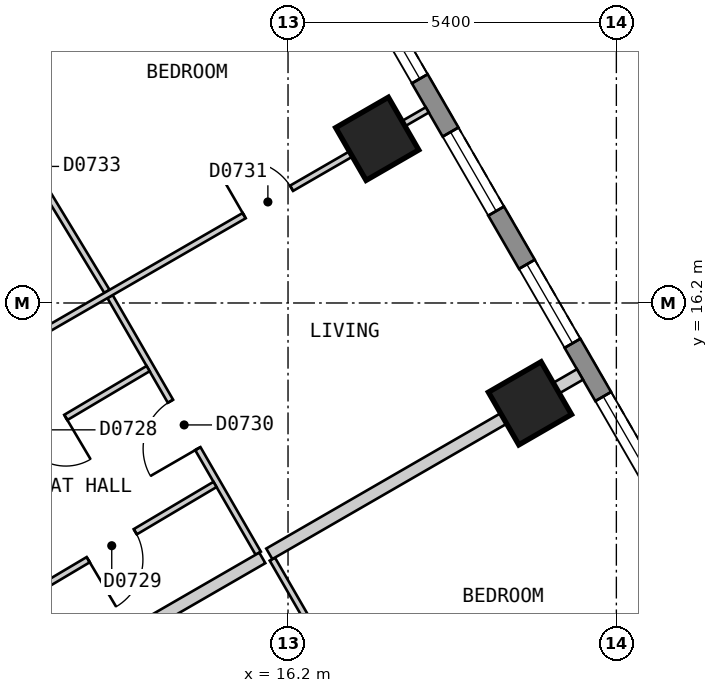
"""IFC4 building model, lengths in metres.
Left out: names, types, materials, properties, quantities, classifications, styles, units other than length and angle.
Written with IfcOpenShell. Run it as: python <this file> out.ifc"""

import sys

from ifc_helpers import new_model, si_unit, direction, frame, frame_2d, origin, origin_2d, place, context, subcontext, project, spatial, polyline, rectangle, outline, extrude, element, fill, save


model = new_model("IFC4")
c1 = context("Model", 3, precision=1e-05, world=origin(), true_north=direction((0.0, 1.0)))
c2 = subcontext(c1, "Body", "Model", "MODEL_VIEW")
j1 = project(units=[si_unit("LENGTHUNIT", "METRE"), si_unit("PLANEANGLEUNIT", "RADIAN")], contexts=[c1])
p1 = place(None, origin())
s1 = spatial("IfcSite", under=j1, at=p1, CompositionType="ELEMENT")
p2 = place(p1, origin())
s2 = spatial("IfcBuilding", under=s1, at=p2, CompositionType="ELEMENT")
p3 = place(p2, frame((0.0, 0.0, 105.0)))
s3 = spatial("IfcBuildingStorey", under=s2, at=p3, CompositionType="ELEMENT", Elevation=105.0)
for number, where, z_axis, x_axis in (
    (1, (20.179, 14.55, 0.0), (0.0, 0.0, 1.0), (-0.5, 0.866, 0.0)),
    (2, (17.667, 18.9, 0.0), (0.0, 0.0, 1.0), (-0.5, 0.866, 0.0)),
):
    element("IfcColumn", number, at=place(p3, frame(where, z_axis=z_axis, x_axis=x_axis)), inside=s3, PredefinedType="COLUMN", context=c2, shape_type="SweptSolid", body=[
        extrude(rectangle(XDim=1.0, YDim=1.0, at=origin_2d()), origin(), (0.0, 0.0, 1.0), 3.0),
    ])
p4 = place(p3, frame((29.027, 1.425, 0.0), z_axis=(0.0, 0.0, 1.0), x_axis=(-0.500027479704, 0.866009537788, 0.0)))
e3 = element("IfcWall", 3, at=p4, inside=s3, PredefinedType="SOLIDWALL", context=c2, shape_type="SweptSolid", body=[
    extrude(outline(polyline([(0.0, -0.15), (26.559, -0.15), (26.478, 0.15), (0.08, 0.15), (0.0, -0.15)])), origin(), (0.0, 0.0, 1.0), 2.6),
])
p5 = place(p4, frame((1.227, 0.0, 0.15)))
e4 = element("IfcOpeningElement", 4, at=p5, cuts=e3, PredefinedType="OPENING", context=c2, shape_type="SweptSolid", body=[
    extrude(rectangle(XDim=1.5, YDim=2.1, at=frame_2d((0.75, 1.05))), frame((0.0, 0.16, 0.0), z_axis=(0.0, -1.0, 0.0), x_axis=(1.0, 0.0, 0.0)), (0.0, 0.0, 1.0), 0.32),
])
p6 = place(p4, frame((3.738, 0.0, 0.15)))
e5 = element("IfcOpeningElement", 5, at=p6, cuts=e3, PredefinedType="OPENING", context=c2, shape_type="SweptSolid", body=[
    extrude(rectangle(XDim=1.5, YDim=2.1, at=frame_2d((0.75, 1.05))), frame((0.0, 0.16, 0.0), z_axis=(0.0, -1.0, 0.0), x_axis=(1.0, 0.0, 0.0)), (0.0, 0.0, 1.0), 0.32),
])
p7 = place(p4, frame((6.25, 0.0, 0.15)))
e6 = element("IfcOpeningElement", 6, at=p7, cuts=e3, PredefinedType="OPENING", context=c2, shape_type="SweptSolid", body=[
    extrude(rectangle(XDim=1.5, YDim=2.1, at=frame_2d((0.75, 1.05))), frame((0.0, 0.16, 0.0), z_axis=(0.0, -1.0, 0.0), x_axis=(1.0, 0.0, 0.0)), (0.0, 0.0, 1.0), 0.32),
])
p8 = place(p4, frame((8.761, 0.0, 0.15)))
e7 = element("IfcOpeningElement", 7, at=p8, cuts=e3, PredefinedType="OPENING", context=c2, shape_type="SweptSolid", body=[
    extrude(rectangle(XDim=1.5, YDim=2.1, at=frame_2d((0.75, 1.05))), frame((0.0, 0.16, 0.0), z_axis=(0.0, -1.0, 0.0), x_axis=(1.0, 0.0, 0.0)), (0.0, 0.0, 1.0), 0.32),
])
p9 = place(p4, frame((11.273, 0.0, 0.15)))
e8 = element("IfcOpeningElement", 8, at=p9, cuts=e3, PredefinedType="OPENING", context=c2, shape_type="SweptSolid", body=[
    extrude(rectangle(XDim=1.5, YDim=2.1, at=frame_2d((0.75, 1.05))), frame((0.0, 0.16, 0.0), z_axis=(0.0, -1.0, 0.0), x_axis=(1.0, 0.0, 0.0)), (0.0, 0.0, 1.0), 0.32),
])
p10 = place(p4, frame((13.785, 0.0, 0.15)))
e9 = element("IfcOpeningElement", 9, at=p10, cuts=e3, PredefinedType="OPENING", context=c2, shape_type="SweptSolid", body=[
    extrude(rectangle(XDim=1.5, YDim=2.1, at=frame_2d((0.75, 1.05))), frame((0.0, 0.16, 0.0), z_axis=(0.0, -1.0, 0.0), x_axis=(1.0, 0.0, 0.0)), (0.0, 0.0, 1.0), 0.32),
])
p11 = place(p4, frame((16.296, 0.0, 0.15)))
e10 = element("IfcOpeningElement", 10, at=p11, cuts=e3, PredefinedType="OPENING", context=c2, shape_type="SweptSolid", body=[
    extrude(rectangle(XDim=1.5, YDim=2.1, at=frame_2d((0.75, 1.05))), frame((0.0, 0.16, 0.0), z_axis=(0.0, -1.0, 0.0), x_axis=(1.0, 0.0, 0.0)), (0.0, 0.0, 1.0), 0.32),
])
p12 = place(p4, frame((18.807, 0.0, 0.15)))
e11 = element("IfcOpeningElement", 11, at=p12, cuts=e3, PredefinedType="OPENING", context=c2, shape_type="SweptSolid", body=[
    extrude(rectangle(XDim=1.5, YDim=2.1, at=frame_2d((0.75, 1.05))), frame((0.0, 0.16, 0.0), z_axis=(0.0, -1.0, 0.0), x_axis=(1.0, 0.0, 0.0)), (0.0, 0.0, 1.0), 0.32),
])
p13 = place(p4, frame((21.319, 0.0, 0.15)))
e12 = element("IfcOpeningElement", 12, at=p13, cuts=e3, PredefinedType="OPENING", context=c2, shape_type="SweptSolid", body=[
    extrude(rectangle(XDim=1.5, YDim=2.1, at=frame_2d((0.75, 1.05))), frame((0.0, 0.16, 0.0), z_axis=(0.0, -1.0, 0.0), x_axis=(1.0, 0.0, 0.0)), (0.0, 0.0, 1.0), 0.32),
])
p14 = place(p4, frame((23.831, 0.0, 0.15)))
e13 = element("IfcOpeningElement", 13, at=p14, cuts=e3, PredefinedType="OPENING", context=c2, shape_type="SweptSolid", body=[
    extrude(rectangle(XDim=1.5, YDim=2.1, at=frame_2d((0.75, 1.05))), frame((0.0, 0.16, 0.0), z_axis=(0.0, -1.0, 0.0), x_axis=(1.0, 0.0, 0.0)), (0.0, 0.0, 1.0), 0.32),
])
p15 = place(p3, frame((8.488, 16.5, 0.0), z_axis=(0.0, 0.0, 1.0), x_axis=(0.499986836607, -0.86603300354, 0.0)))
e14 = element("IfcWall", 14, at=p15, inside=s3, PredefinedType="PARTITIONING", context=c2, shape_type="SweptSolid", body=[
    extrude(rectangle(XDim=20.09, YDim=0.2, at=frame_2d((10.045, 0.0))), origin(), (0.0, 0.0, 1.0), 2.6),
])
p16 = place(p15, frame((14.569, 0.0, 0.0)))
e15 = element("IfcOpeningElement", 15, at=p16, cuts=e14, PredefinedType="OPENING", context=c2, shape_type="SweptSolid", body=[
    extrude(rectangle(XDim=1.0, YDim=2.1, at=frame_2d((0.5, 1.05))), frame((0.0, 0.11, 0.0), z_axis=(0.0, -1.0, 0.0), x_axis=(1.0, 0.0, 0.0)), (0.0, 0.0, 1.0), 0.22),
])
p17 = place(p15, frame((4.547, 0.0, 0.0)))
e16 = element("IfcOpeningElement", 16, at=p17, cuts=e14, PredefinedType="OPENING", context=c2, shape_type="SweptSolid", body=[
    extrude(rectangle(XDim=1.0, YDim=2.1, at=frame_2d((0.5, 1.05))), frame((0.0, 0.11, 0.0), z_axis=(0.0, -1.0, 0.0), x_axis=(1.0, 0.0, 0.0)), (0.0, 0.0, 1.0), 0.22),
])
p18 = place(p3, frame((10.706, 20.543, 0.0), z_axis=(0.0, 0.0, 1.0), x_axis=(0.518240414093, -0.855234981278, 0.0)))
e17 = element("IfcWall", 17, at=p18, inside=s3, PredefinedType="PARTITIONING", context=c2, shape_type="SweptSolid", body=[
    extrude(rectangle(XDim=4.855, YDim=0.1, at=frame_2d((2.427, 0.0))), origin(), (0.0, 0.0, 1.0), 2.6),
])
p19 = place(p18, frame((2.052, 0.0, 0.0)))
e18 = element("IfcOpeningElement", 18, at=p19, cuts=e17, PredefinedType="OPENING", context=c2, shape_type="SweptSolid", body=[
    extrude(rectangle(XDim=0.8, YDim=2.1, at=frame_2d((0.4, 1.05))), frame((0.0, 0.06, 0.0), z_axis=(0.0, -1.0, 0.0), x_axis=(1.0, 0.0, 0.0)), (0.0, 0.0, 1.0), 0.12),
])
p20 = place(p3, frame((13.273, 16.305, 0.0), z_axis=(0.0, 0.0, 1.0), x_axis=(0.500093956194, -0.865971151354, 0.0)))
e19 = element("IfcWall", 19, at=p20, inside=s3, PredefinedType="PARTITIONING", context=c2, shape_type="SweptSolid", body=[
    extrude(rectangle(XDim=4.873, YDim=0.1, at=frame_2d((2.437, 0.0))), origin(), (0.0, 0.0, 1.0), 2.6),
])
p21 = place(p20, frame((1.987, 0.0, 0.0)))
e20 = element("IfcOpeningElement", 20, at=p21, cuts=e19, PredefinedType="OPENING", context=c2, shape_type="SweptSolid", body=[
    extrude(rectangle(XDim=0.9, YDim=2.1, at=frame_2d((0.45, 1.05))), frame((0.0, 0.06, 0.0), z_axis=(0.0, -1.0, 0.0), x_axis=(1.0, 0.0, 0.0)), (0.0, 0.0, 1.0), 0.12),
])
p22 = place(p3, frame((15.942, 11.988, 0.0), z_axis=(0.0, 0.0, 1.0), x_axis=(0.499995794706, -0.866027831699, 0.0)))
e21 = element("IfcWall", 21, at=p22, inside=s3, PredefinedType="PARTITIONING", context=c2, shape_type="SweptSolid", body=[
    extrude(rectangle(XDim=4.922, YDim=0.1, at=frame_2d((2.461, 0.0))), origin(), (0.0, 0.0, 1.0), 2.6),
])
p23 = place(p3, frame((9.83, 14.375, 0.0), z_axis=(0.0, 0.0, 1.0), x_axis=(0.866016855193, 0.500014806302, 0.0)))
e22 = element("IfcWall", 22, at=p23, inside=s3, PredefinedType="PARTITIONING", context=c2, shape_type="SweptSolid", body=[
    extrude(rectangle(XDim=10.0, YDim=0.1, at=frame_2d((5.0, 0.0))), origin(), (0.0, 0.0, 1.0), 2.6),
])
p24 = place(p23, frame((6.523, 0.0, 0.0)))
e23 = element("IfcOpeningElement", 23, at=p24, cuts=e22, PredefinedType="OPENING", context=c2, shape_type="SweptSolid", body=[
    extrude(rectangle(XDim=0.9, YDim=2.1, at=frame_2d((0.45, 1.05))), frame((0.0, 0.06, 0.0), z_axis=(0.0, -1.0, 0.0), x_axis=(1.0, 0.0, 0.0)), (0.0, 0.0, 1.0), 0.12),
])
p25 = place(p3, frame((11.647, 11.227, 0.0), z_axis=(0.0, 0.0, 1.0), x_axis=(0.859997349349, 0.510298500011, 0.0)))
e24 = element("IfcWall", 24, at=p25, inside=s3, PredefinedType="PARTITIONING", context=c2, shape_type="SweptSolid", body=[
    extrude(rectangle(XDim=3.898, YDim=0.1, at=frame_2d((1.949, 0.0))), origin(), (0.0, 0.0, 1.0), 2.6),
])
p26 = place(p25, frame((1.473, 0.0, 0.0)))
e25 = element("IfcOpeningElement", 25, at=p26, cuts=e24, PredefinedType="OPENING", context=c2, shape_type="SweptSolid", body=[
    extrude(rectangle(XDim=0.9, YDim=2.1, at=frame_2d((0.45, 1.05))), frame((0.0, 0.06, 0.0), z_axis=(0.0, -1.0, 0.0), x_axis=(1.0, 0.0, 0.0)), (0.0, 0.0, 1.0), 0.12),
])
p27 = place(p3, frame((10.547, 13.133, 0.0), z_axis=(0.0, 0.0, 1.0), x_axis=(0.860090994311, 0.510140648749, 0.0)))
e26 = element("IfcWall", 26, at=p27, inside=s3, PredefinedType="PARTITIONING", context=c2, shape_type="SweptSolid", body=[
    extrude(rectangle(XDim=3.897, YDim=0.1, at=frame_2d((1.948, 0.0))), origin(), (0.0, 0.0, 1.0), 2.6),
])
p28 = place(p27, frame((1.523, 0.0, 0.0)))
e27 = element("IfcOpeningElement", 27, at=p28, cuts=e26, PredefinedType="OPENING", context=c2, shape_type="SweptSolid", body=[
    extrude(rectangle(XDim=0.8, YDim=2.1, at=frame_2d((0.4, 1.05))), frame((0.0, 0.06, 0.0), z_axis=(0.0, -1.0, 0.0), x_axis=(1.0, 0.0, 0.0)), (0.0, 0.0, 1.0), 0.12),
])
p29 = place(p3, frame((12.342, 10.025, 0.0), z_axis=(0.0, 0.0, 1.0), x_axis=(0.866033886885, 0.499985306551, 0.0)))
e28 = element("IfcWall", 28, at=p29, inside=s3, PredefinedType="PARTITIONING", context=c2, shape_type="SweptSolid", body=[
    extrude(rectangle(XDim=3.966, YDim=0.2, at=frame_2d((1.983, 0.0))), origin(), (0.0, 0.0, 1.0), 2.6),
])
p30 = place(p3, frame((15.892, 12.075, 0.0), z_axis=(0.0, 0.0, 1.0), x_axis=(0.866000883696, 0.500042467634, 0.0)))
e29 = element("IfcWall", 29, at=p30, inside=s3, PredefinedType="PARTITIONING", context=c2, shape_type="SweptSolid", body=[
    extrude(rectangle(XDim=5.899, YDim=0.2, at=frame_2d((2.95, 0.0))), origin(), (0.0, 0.0, 1.0), 2.6),
])
p31 = place(p10, origin())
e30 = element("IfcWindow", 30, at=p31, inside=s3, PartitioningType="SINGLE_PANEL", PredefinedType="WINDOW", context=c2, shape_type="SweptSolid", body=[
    extrude(rectangle(XDim=1.5, YDim=2.1, at=frame_2d((0.75, 1.05))), frame((0.0, 0.03, 0.0), z_axis=(0.0, -1.0, 0.0), x_axis=(1.0, 0.0, 0.0)), (0.0, 0.0, 1.0), 0.06),
])
fill(e9, e30)
p32 = place(p11, origin())
e31 = element("IfcWindow", 31, at=p32, inside=s3, PartitioningType="SINGLE_PANEL", PredefinedType="WINDOW", context=c2, shape_type="SweptSolid", body=[
    extrude(rectangle(XDim=1.5, YDim=2.1, at=frame_2d((0.75, 1.05))), frame((0.0, 0.03, 0.0), z_axis=(0.0, -1.0, 0.0), x_axis=(1.0, 0.0, 0.0)), (0.0, 0.0, 1.0), 0.06),
])
fill(e10, e31)
p33 = place(p12, origin())
e32 = element("IfcWindow", 32, at=p33, inside=s3, PartitioningType="SINGLE_PANEL", PredefinedType="WINDOW", context=c2, shape_type="SweptSolid", body=[
    extrude(rectangle(XDim=1.5, YDim=2.1, at=frame_2d((0.75, 1.05))), frame((0.0, 0.03, 0.0), z_axis=(0.0, -1.0, 0.0), x_axis=(1.0, 0.0, 0.0)), (0.0, 0.0, 1.0), 0.06),
])
fill(e11, e32)
p34 = place(p13, origin())
e33 = element("IfcWindow", 33, at=p34, inside=s3, PartitioningType="SINGLE_PANEL", PredefinedType="WINDOW", context=c2, shape_type="SweptSolid", body=[
    extrude(rectangle(XDim=1.5, YDim=2.1, at=frame_2d((0.75, 1.05))), frame((0.0, 0.03, 0.0), z_axis=(0.0, -1.0, 0.0), x_axis=(1.0, 0.0, 0.0)), (0.0, 0.0, 1.0), 0.06),
])
fill(e12, e33)
p35 = place(p28, origin())
e34 = element("IfcDoor", 34, at=p35, inside=s3, OperationType="SINGLE_SWING_RIGHT", PredefinedType="DOOR", context=c2, shape_type="SweptSolid", body=[
    extrude(rectangle(XDim=0.8, YDim=2.1, at=frame_2d((0.4, 1.05))), frame((0.0, 0.025, 0.0), z_axis=(0.0, -1.0, 0.0), x_axis=(1.0, 0.0, 0.0)), (0.0, 0.0, 1.0), 0.05),
])
fill(e27, e34)
p36 = place(p26, origin())
e35 = element("IfcDoor", 35, at=p36, inside=s3, OperationType="SINGLE_SWING_LEFT", PredefinedType="DOOR", context=c2, shape_type="SweptSolid", body=[
    extrude(rectangle(XDim=0.9, YDim=2.1, at=frame_2d((0.45, 1.05))), frame((0.0, 0.025, 0.0), z_axis=(0.0, -1.0, 0.0), x_axis=(1.0, 0.0, 0.0)), (0.0, 0.0, 1.0), 0.05),
])
fill(e25, e35)
p37 = place(p21, origin())
e36 = element("IfcDoor", 36, at=p37, inside=s3, OperationType="SINGLE_SWING_RIGHT", PredefinedType="DOOR", context=c2, shape_type="SweptSolid", body=[
    extrude(rectangle(XDim=0.9, YDim=2.1, at=frame_2d((0.45, 1.05))), frame((0.0, 0.025, 0.0), z_axis=(0.0, -1.0, 0.0), x_axis=(1.0, 0.0, 0.0)), (0.0, 0.0, 1.0), 0.05),
])
fill(e20, e36)
p38 = place(p24, origin())
e37 = element("IfcDoor", 37, at=p38, inside=s3, OperationType="SINGLE_SWING_LEFT", PredefinedType="DOOR", context=c2, shape_type="SweptSolid", body=[
    extrude(rectangle(XDim=0.9, YDim=2.1, at=frame_2d((0.45, 1.05))), frame((0.0, 0.025, 0.0), z_axis=(0.0, -1.0, 0.0), x_axis=(1.0, 0.0, 0.0)), (0.0, 0.0, 1.0), 0.05),
])
fill(e23, e37)
save(model, sys.argv[1])
